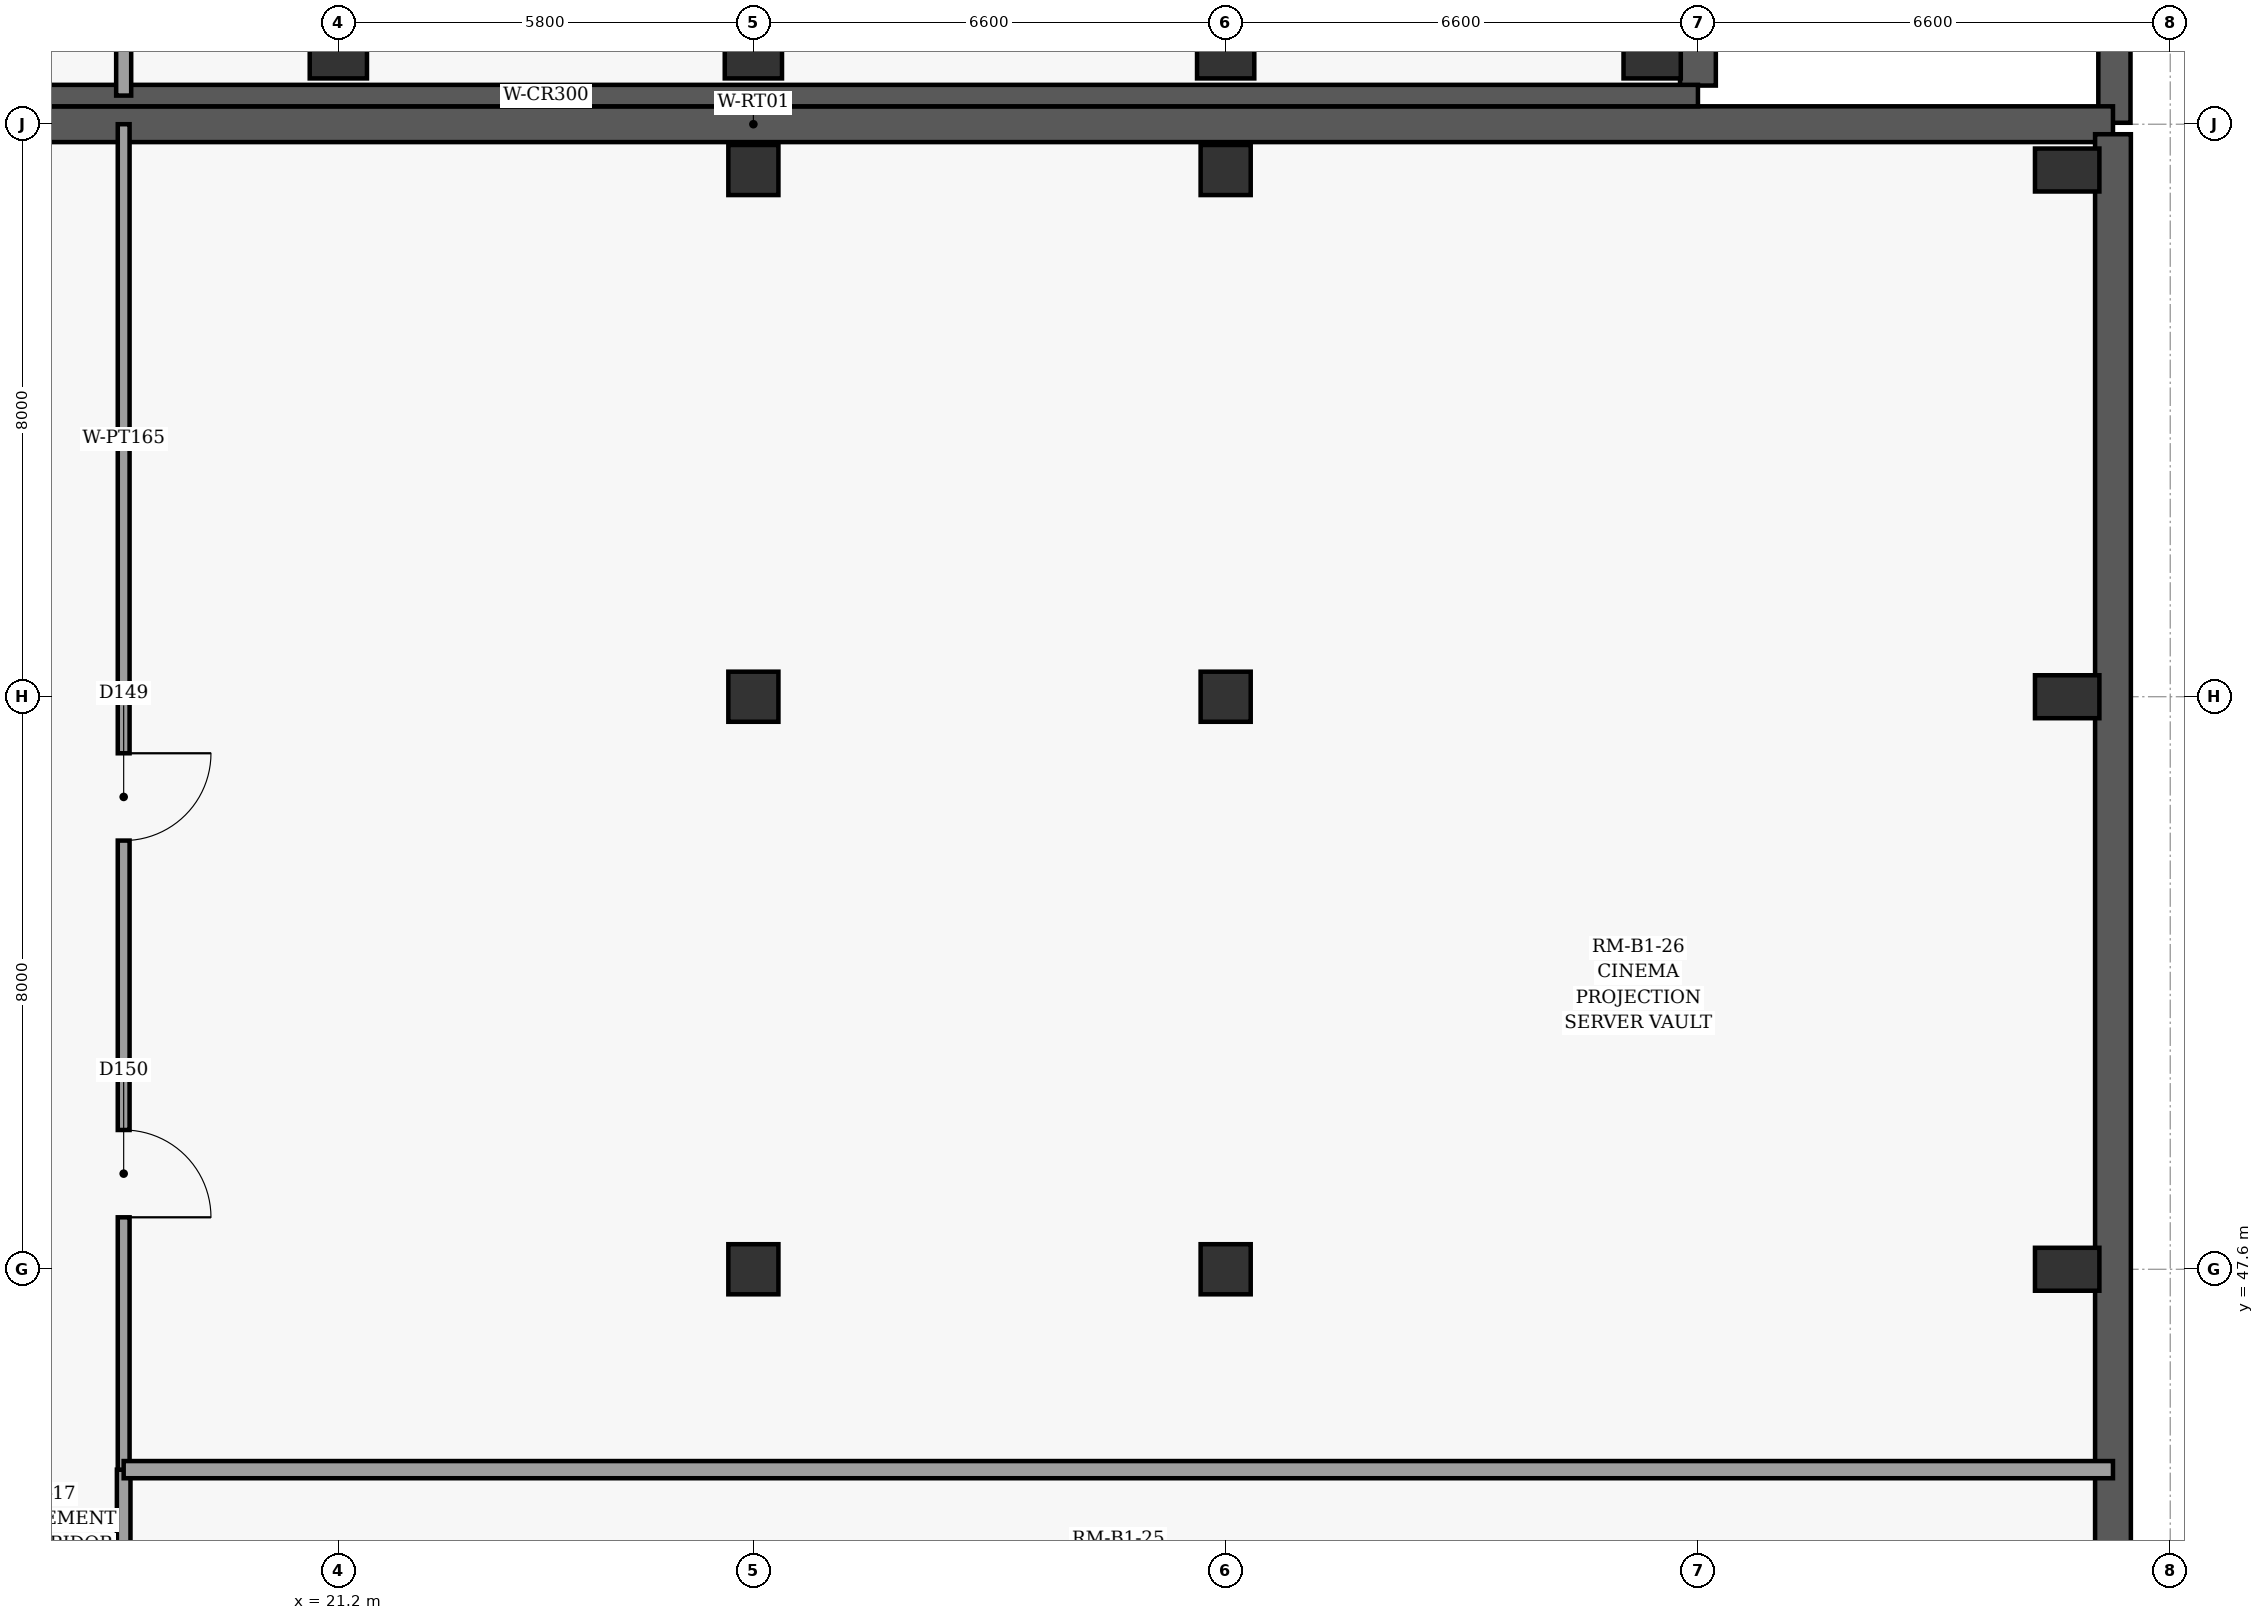
"""IFC4 building model, lengths in metres.
Left out: names, types, materials, properties, quantities, classifications, styles, units other than length and angle.
Written with IfcOpenShell. Run it as: python <this file> out.ifc"""

import sys

from ifc_helpers import new_model, si_unit, direction, frame, frame_2d, origin, origin_2d, place, context, subcontext, project, spatial, rectangle, extrude, element, fill, save


model = new_model("IFC4")
c1 = context("Model", 3, precision=1e-05, world=origin(), true_north=direction((0.0, 1.0)))
c2 = subcontext(c1, "Body", "Model", "MODEL_VIEW")
j1 = project(units=[si_unit("LENGTHUNIT", "METRE"), si_unit("PLANEANGLEUNIT", "RADIAN")], contexts=[c1])
p1 = place(None, origin())
s1 = spatial("IfcSite", under=j1, at=p1, CompositionType="ELEMENT")
p2 = place(p1, origin())
s2 = spatial("IfcBuilding", under=s1, at=p2, CompositionType="ELEMENT")
p3 = place(p2, frame((0.0, 0.0, -4.8)))
s3 = spatial("IfcBuildingStorey", under=s2, at=p3, CompositionType="ELEMENT", Elevation=-4.8)
for number, where, z_axis, x_axis in (
    (1, (27.0, 47.6, 0.0), (0.0, 0.0, 1.0), (1.0, 0.0, 0.0)),
    (2, (27.0, 55.6, 0.0), (0.0, 0.0, 1.0), (1.0, 0.0, 0.0)),
    (3, (27.0, 62.96, 0.0), (0.0, 0.0, 1.0), (1.0, 0.0, 0.0)),
    (4, (33.6, 47.6, 0.0), (0.0, 0.0, 1.0), (1.0, 0.0, 0.0)),
    (5, (33.6, 55.6, 0.0), (0.0, 0.0, 1.0), (1.0, 0.0, 0.0)),
    (6, (33.6, 62.96, 0.0), (0.0, 0.0, 1.0), (1.0, 0.0, 0.0)),
):
    element("IfcColumn", number, at=place(p3, frame(where, z_axis=z_axis, x_axis=x_axis)), inside=s3, PredefinedType="COLUMN", context=c2, shape_type="SweptSolid", body=[
        extrude(rectangle(XDim=0.7, YDim=0.7, at=origin_2d()), origin(), (0.0, 0.0, 1.0), 4.8),
    ])
for number, where, z_axis, x_axis in (
    (7, (45.36, 47.6, 0.0), (0.0, 0.0, 1.0), (1.0, 0.0, 0.0)),
    (8, (45.36, 55.6, 0.0), (0.0, 0.0, 1.0), (1.0, 0.0, 0.0)),
    (9, (45.36, 62.96, 0.0), (0.0, 0.0, 1.0), (1.0, 0.0, 0.0)),
):
    element("IfcColumn", number, at=place(p3, frame(where, z_axis=z_axis, x_axis=x_axis)), inside=s3, PredefinedType="COLUMN", context=c2, shape_type="SweptSolid", body=[
        extrude(rectangle(XDim=0.6, YDim=0.9, at=origin_2d()), origin(), (0.0, 0.0, 1.0), 4.8),
    ])
for number, where, z_axis, x_axis in (
    (10, (21.2, 64.64, 0.0), (0.0, 0.0, 1.0), (1.0, 0.0, 0.0)),
    (11, (27.0, 64.64, 0.0), (0.0, 0.0, 1.0), (1.0, 0.0, 0.0)),
    (12, (33.6, 64.64, 0.0), (0.0, 0.0, 1.0), (1.0, 0.0, 0.0)),
    (13, (39.56, 64.64, 0.0), (0.0, 0.0, 1.0), (1.0, 0.0, 0.0)),
):
    element("IfcColumn", number, at=place(p3, frame(where, z_axis=z_axis, x_axis=x_axis)), inside=s3, PredefinedType="COLUMN", context=c2, shape_type="SweptSolid", body=[
        extrude(rectangle(XDim=0.8, YDim=0.8, at=origin_2d()), origin(), (0.0, 0.0, 1.0), 4.8),
    ])
p4 = place(p3, frame((46.02, 63.62, 0.0), z_axis=(0.0, 0.0, 1.0), x_axis=(0.0, 1.0, 0.0)))
e14 = element("IfcWall", 14, at=p4, inside=s3, PredefinedType="USERDEFINED", context=c2, shape_type="SweptSolid", body=[
    extrude(rectangle(XDim=11.16, YDim=0.45, at=frame_2d((5.58, 0.0))), origin(), (0.0, 0.0, 1.0), 4.53),
])
p5 = place(p3, frame((8.0, 63.6, 0.0), z_axis=(0.0, 0.0, 1.0), x_axis=(1.0, 0.0, 0.0)))
e15 = element("IfcWall", 15, at=p5, inside=s3, PredefinedType="USERDEFINED", context=c2, shape_type="SweptSolid", body=[
    extrude(rectangle(XDim=38.0, YDim=0.5, at=frame_2d((19.0, 0.0))), origin(), (0.0, 0.0, 1.0), 4.5),
])
p6 = place(p3, frame((46.0, 63.46, 0.0), z_axis=(0.0, 0.0, 1.0), x_axis=(0.0, -1.0, 0.0)))
e16 = element("IfcWall", 16, at=p6, inside=s3, PredefinedType="USERDEFINED", context=c2, shape_type="SweptSolid", body=[
    extrude(rectangle(XDim=55.72, YDim=0.5, at=frame_2d((27.86, 0.0))), origin(), (0.0, 0.0, 1.0), 4.5),
])
p7 = place(p3, frame((40.2, 93.86, 0.0), z_axis=(0.0, 0.0, 1.0), x_axis=(0.0, -1.0, 0.0)))
e17 = element("IfcWall", 17, at=p7, inside=s3, PredefinedType="USERDEFINED", context=c2, shape_type="SweptSolid", body=[
    extrude(rectangle(XDim=29.72, YDim=0.5, at=frame_2d((14.86, 0.0))), origin(), (0.0, 0.0, 1.0), 4.5),
])
p8 = place(p3, frame((40.2, 64.0, 0.0), z_axis=(0.0, 0.0, 1.0), x_axis=(-1.0, 0.0, 0.0)))
e18 = element("IfcWall", 18, at=p8, inside=s3, PredefinedType="SHEAR", context=c2, shape_type="SweptSolid", body=[
    extrude(rectangle(XDim=32.2, YDim=0.3, at=frame_2d((16.1, 0.0))), origin(), (0.0, 0.0, 1.0), 4.5),
])
p9 = place(p3, frame((18.2, 44.8, 0.0), z_axis=(0.0, 0.0, 1.0), x_axis=(0.0, -1.0, 0.0)))
e19 = element("IfcWall", 19, at=p9, inside=s3, PredefinedType="PARTITIONING", context=c2, shape_type="SweptSolid", body=[
    extrude(rectangle(XDim=18.8, YDim=0.19, at=frame_2d((9.4, 0.0))), origin(), (0.0, 0.0, 1.0), 4.5),
])
p10 = place(p9, frame((8.81, 0.0, 0.0)))
e20 = element("IfcOpeningElement", 20, at=p10, cuts=e19, PredefinedType="OPENING", context=c2, shape_type="SweptSolid", body=[
    extrude(rectangle(XDim=1.18, YDim=2.15, at=frame_2d((0.59, 1.075))), frame((0.0, 0.105, 0.0), z_axis=(0.0, -1.0, 0.0), x_axis=(1.0, 0.0, 0.0)), (0.0, 0.0, 1.0), 0.21),
])
p11 = place(p9, frame((13.964, 0.0, 0.0)))
e21 = element("IfcOpeningElement", 21, at=p11, cuts=e19, PredefinedType="OPENING", context=c2, shape_type="SweptSolid", body=[
    extrude(rectangle(XDim=1.4, YDim=2.25, at=frame_2d((0.7, 1.125))), frame((0.0, 0.105, 0.0), z_axis=(0.0, -1.0, 0.0), x_axis=(1.0, 0.0, 0.0)), (0.0, 0.0, 1.0), 0.21),
])
p12 = place(p3, frame((18.2, 63.6, 0.0), z_axis=(0.0, 0.0, 1.0), x_axis=(0.0, -1.0, 0.0)))
e22 = element("IfcWall", 22, at=p12, inside=s3, PredefinedType="PARTITIONING", context=c2, shape_type="SweptSolid", body=[
    extrude(rectangle(XDim=18.8, YDim=0.165, at=frame_2d((9.4, 0.0))), origin(), (0.0, 0.0, 1.0), 4.5),
])
p13 = place(p12, frame((8.79, 0.0, 0.0)))
e23 = element("IfcOpeningElement", 23, at=p13, cuts=e22, PredefinedType="OPENING", context=c2, shape_type="SweptSolid", body=[
    extrude(rectangle(XDim=1.22, YDim=2.2, at=frame_2d((0.61, 1.1))), frame((0.0, 0.093, 0.0), z_axis=(0.0, -1.0, 0.0), x_axis=(1.0, 0.0, 0.0)), (0.0, 0.0, 1.0), 0.185),
])
p14 = place(p12, frame((14.054, 0.0, 0.0)))
e24 = element("IfcOpeningElement", 24, at=p14, cuts=e22, PredefinedType="OPENING", context=c2, shape_type="SweptSolid", body=[
    extrude(rectangle(XDim=1.22, YDim=2.2, at=frame_2d((0.61, 1.1))), frame((0.0, 0.093, 0.0), z_axis=(0.0, -1.0, 0.0), x_axis=(1.0, 0.0, 0.0)), (0.0, 0.0, 1.0), 0.185),
])
p15 = place(p3, frame((18.2, 44.8, 0.0), z_axis=(0.0, 0.0, 1.0), x_axis=(1.0, 0.0, 0.0)))
e25 = element("IfcWall", 25, at=p15, inside=s3, PredefinedType="PARTITIONING", context=c2, shape_type="SweptSolid", body=[
    extrude(rectangle(XDim=27.8, YDim=0.24, at=frame_2d((13.9, 0.0))), origin(), (0.0, 0.0, 1.0), 4.5),
])
p16 = place(p3, frame((18.2, 79.0, 0.0), z_axis=(0.0, 0.0, 1.0), x_axis=(0.0, -1.0, 0.0)))
e26 = element("IfcWall", 26, at=p16, inside=s3, PredefinedType="PARTITIONING", context=c2, shape_type="SweptSolid", body=[
    extrude(rectangle(XDim=15.0, YDim=0.21, at=frame_2d((7.5, 0.0))), origin(), (0.0, 0.0, 1.0), 4.5),
])
p17 = place(p16, frame((6.625, 0.0, 0.0)))
e27 = element("IfcOpeningElement", 27, at=p17, cuts=e26, PredefinedType="OPENING", context=c2, shape_type="SweptSolid", body=[
    extrude(rectangle(XDim=1.75, YDim=2.35, at=frame_2d((0.875, 1.175))), frame((0.0, 0.115, 0.0), z_axis=(0.0, -1.0, 0.0), x_axis=(1.0, 0.0, 0.0)), (0.0, 0.0, 1.0), 0.23),
])
p18 = place(p16, frame((11.0, 0.0, 0.0)))
e28 = element("IfcOpeningElement", 28, at=p18, cuts=e26, PredefinedType="OPENING", context=c2, shape_type="SweptSolid", body=[
    extrude(rectangle(XDim=1.4, YDim=2.25, at=frame_2d((0.7, 1.125))), frame((0.0, 0.115, 0.0), z_axis=(0.0, -1.0, 0.0), x_axis=(1.0, 0.0, 0.0)), (0.0, 0.0, 1.0), 0.23),
])
p19 = place(p13, origin())
e29 = element("IfcDoor", 29, at=p19, inside=s3, OperationType="SINGLE_SWING_LEFT", PredefinedType="DOOR", context=c2, shape_type="SweptSolid", body=[
    extrude(rectangle(XDim=1.22, YDim=2.2, at=frame_2d((0.61, 1.1))), frame((0.0, 0.025, 0.0), z_axis=(0.0, -1.0, 0.0), x_axis=(1.0, 0.0, 0.0)), (0.0, 0.0, 1.0), 0.05),
])
fill(e23, e29)
p20 = place(p14, origin())
e30 = element("IfcDoor", 30, at=p20, inside=s3, OperationType="SINGLE_SWING_RIGHT", PredefinedType="DOOR", context=c2, shape_type="SweptSolid", body=[
    extrude(rectangle(XDim=1.22, YDim=2.2, at=frame_2d((0.61, 1.1))), frame((0.0, 0.025, 0.0), z_axis=(0.0, -1.0, 0.0), x_axis=(1.0, 0.0, 0.0)), (0.0, 0.0, 1.0), 0.05),
])
fill(e24, e30)
save(model, sys.argv[1])
